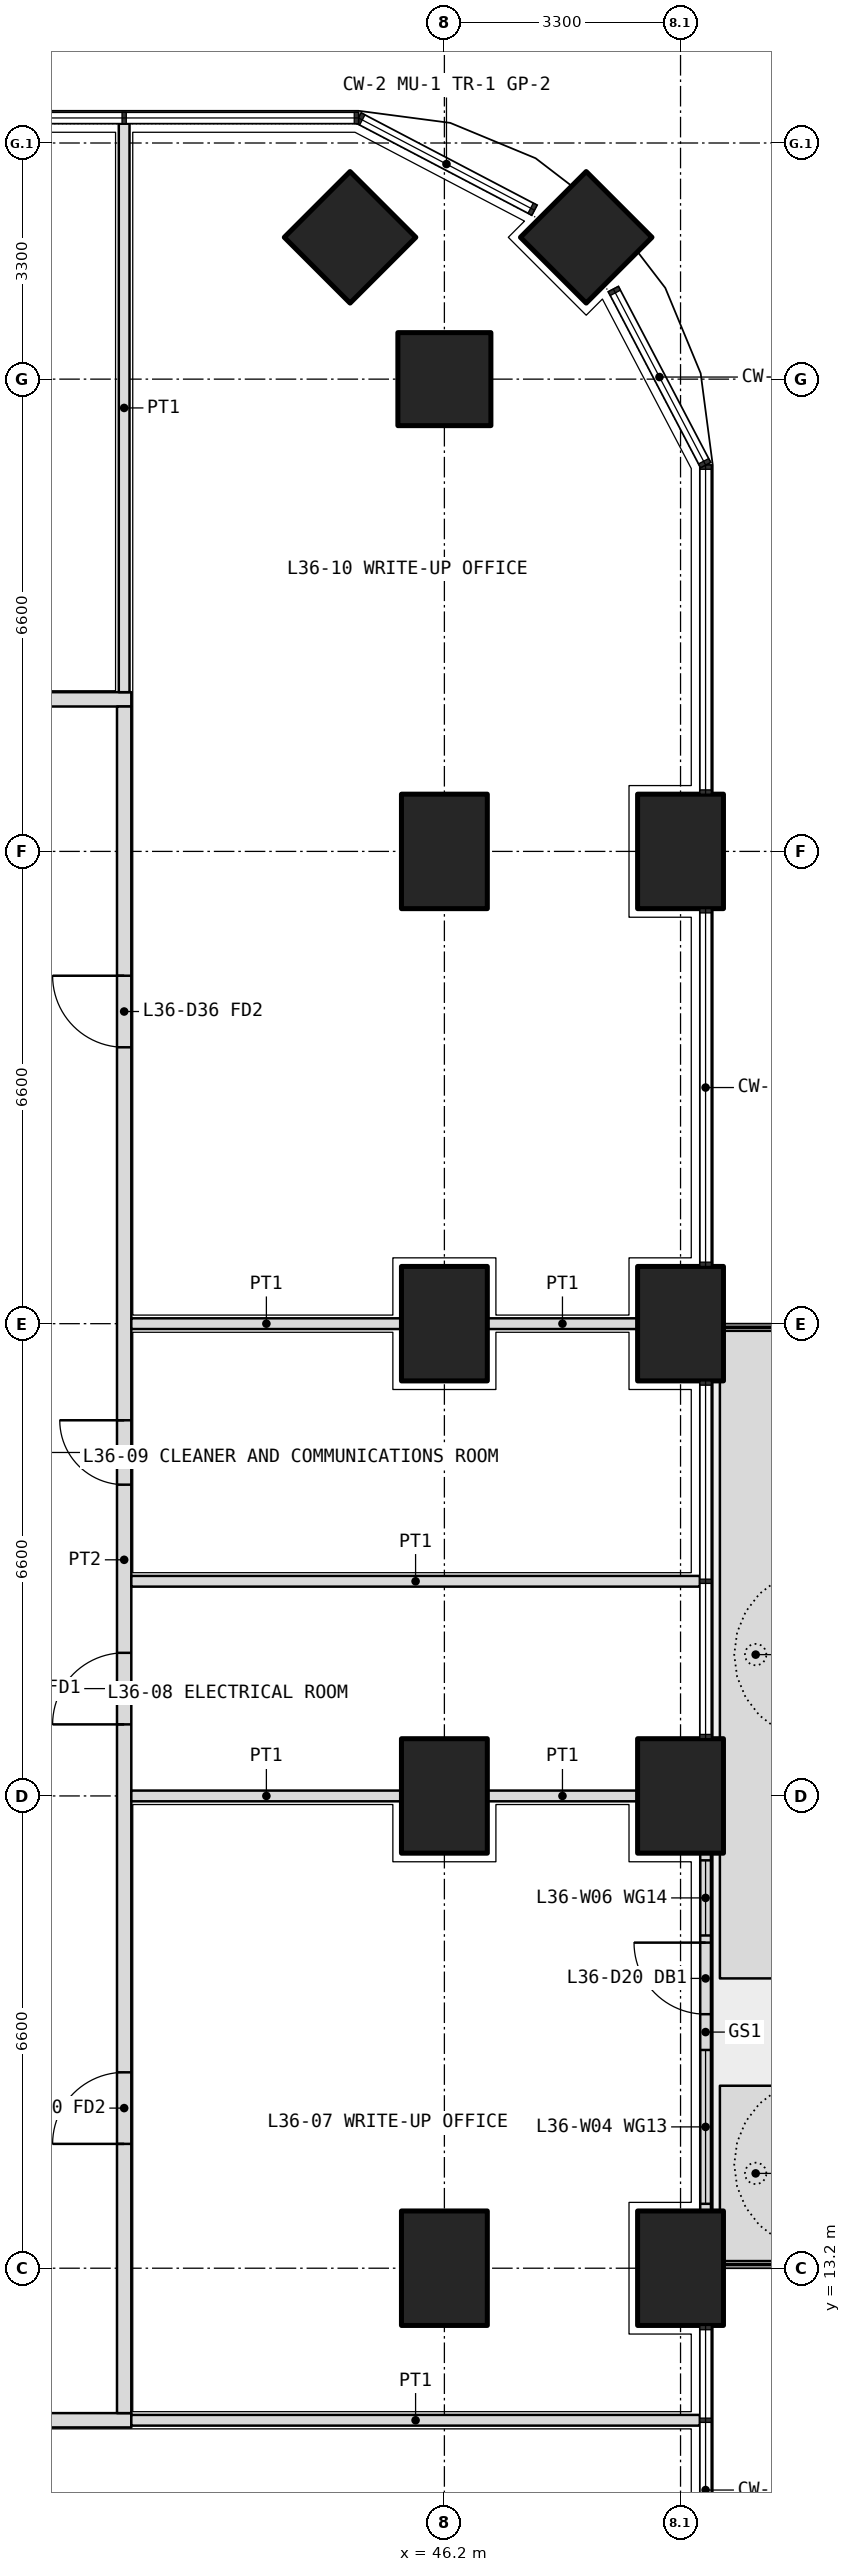
"""IFC4 building model, lengths in metres.
Left out: names, types, materials, properties, quantities, classifications, styles, units other than length and angle.
Written with IfcOpenShell. Run it as: python <this file> out.ifc"""

import sys

from ifc_helpers import new_model, si_unit, direction, frame, frame_2d, origin, origin_2d, place, context, subcontext, project, spatial, polyline, rectangle, outline, extrude, element, fill, save


model = new_model("IFC4")
c1 = context("Model", 3, precision=1e-05, world=origin(), true_north=direction((0.0, 1.0)))
c2 = subcontext(c1, "Body", "Model", "MODEL_VIEW")
j1 = project(units=[si_unit("LENGTHUNIT", "METRE"), si_unit("PLANEANGLEUNIT", "RADIAN")], contexts=[c1])
p1 = place(None, origin())
s1 = spatial("IfcSite", under=j1, at=p1, CompositionType="ELEMENT")
p2 = place(p1, origin())
s2 = spatial("IfcBuilding", under=s1, at=p2, CompositionType="ELEMENT")
p3 = place(p2, frame((0.0, 0.0, 159.9)))
s3 = spatial("IfcBuildingStorey", under=s2, at=p3, CompositionType="ELEMENT", Elevation=159.9)
p4 = place(p3, frame((48.182, 41.582, 0.0), z_axis=(0.0, 0.0, 1.0), x_axis=(0.707106781187, 0.707106781187, 0.0)))
e1 = element("IfcColumn", 1, at=p4, inside=s3, PredefinedType="COLUMN", context=c2, shape_type="SweptSolid", body=[
    extrude(rectangle(XDim=1.3, YDim=1.3, at=origin_2d()), origin(), (0.0, 0.0, 1.0), 4.2),
])
for number, where, z_axis, x_axis in (
    (2, (49.5, 13.2, 0.0), (0.0, 0.0, 1.0), (0.0, 1.0, 0.0)),
    (3, (49.5, 19.8, 0.0), (0.0, 0.0, 1.0), (0.0, 1.0, 0.0)),
    (4, (49.5, 26.4, 0.0), (0.0, 0.0, 1.0), (0.0, 1.0, 0.0)),
    (5, (49.5, 33.0, 0.0), (0.0, 0.0, 1.0), (0.0, 1.0, 0.0)),
):
    element("IfcColumn", number, at=place(p3, frame(where, z_axis=z_axis, x_axis=x_axis)), inside=s3, PredefinedType="COLUMN", context=c2, shape_type="SweptSolid", body=[
        extrude(rectangle(XDim=1.6, YDim=1.2, at=origin_2d()), origin(), (0.0, 0.0, 1.0), 4.2),
    ])
for number, where, z_axis, x_axis in (
    (6, (46.2, 39.6, 0.0), (0.0, 0.0, 1.0), (1.0, 0.0, 0.0)),
    (7, (44.882, 41.582, 0.0), (0.0, 0.0, 1.0), (0.707, 0.707, 0.0)),
):
    element("IfcColumn", number, at=place(p3, frame(where, z_axis=z_axis, x_axis=x_axis)), inside=s3, PredefinedType="COLUMN", context=c2, shape_type="SweptSolid", body=[
        extrude(rectangle(XDim=1.3, YDim=1.3, at=origin_2d()), origin(), (0.0, 0.0, 1.0), 4.2),
    ])
for number, where, z_axis, x_axis in (
    (8, (46.2, 13.2, 0.0), (0.0, 0.0, 1.0), (0.0, 1.0, 0.0)),
    (9, (46.2, 19.8, 0.0), (0.0, 0.0, 1.0), (0.0, 1.0, 0.0)),
    (10, (46.2, 26.4, 0.0), (0.0, 0.0, 1.0), (0.0, 1.0, 0.0)),
    (11, (46.2, 33.0, 0.0), (0.0, 0.0, 1.0), (0.0, 1.0, 0.0)),
):
    element("IfcColumn", number, at=place(p3, frame(where, z_axis=z_axis, x_axis=x_axis)), inside=s3, PredefinedType="COLUMN", context=c2, shape_type="SweptSolid", body=[
        extrude(rectangle(XDim=1.6, YDim=1.2, at=origin_2d()), origin(), (0.0, 0.0, 1.0), 4.2),
    ])
p5 = place(p3, origin())
e12 = element("IfcWall", 12, at=p5, inside=s3, PredefinedType="USERDEFINED", context=c2, shape_type="SweptSolid", body=[
    extrude(outline(polyline([(50.05, 13.3), (51.05, 13.3), (51.05, 15.75), (50.05, 15.75), (50.05, 13.3)]), holes=[polyline([(50.2, 13.45), (50.9, 13.45), (50.9, 15.6), (50.2, 15.6), (50.2, 13.45)])]), origin(), (0.0, 0.0, 1.0), 1.05),
])
p6 = place(p3, origin())
e13 = element("IfcWall", 13, at=p6, inside=s3, PredefinedType="USERDEFINED", context=c2, shape_type="SweptSolid", body=[
    extrude(outline(polyline([(50.05, 17.25), (51.05, 17.25), (51.05, 26.3), (50.05, 26.3), (50.05, 17.25)]), holes=[polyline([(50.2, 17.4), (50.9, 17.4), (50.9, 26.15), (50.2, 26.15), (50.2, 17.4)])]), origin(), (0.0, 0.0, 1.0), 1.05),
])
p7 = place(p3, frame((49.85, 14.0, 0.0), z_axis=(0.0, 0.0, 1.0), x_axis=(0.0, 1.0, 0.0)))
e14 = element("IfcWall", 14, at=p7, inside=s3, PredefinedType="SOLIDWALL", context=c2, shape_type="SweptSolid", body=[
    extrude(rectangle(XDim=5.0, YDim=0.15, at=frame_2d((2.5, 0.0))), origin(), (0.0, 0.0, 1.0), 2.7),
])
p8 = place(p7, frame((2.75, 0.0, 0.0)))
e15 = element("IfcOpeningElement", 15, at=p8, cuts=e14, PredefinedType="OPENING", context=c2, shape_type="SweptSolid", body=[
    extrude(rectangle(XDim=1.0, YDim=2.4, at=frame_2d((0.5, 1.2))), frame((0.0, 0.085, 0.0), z_axis=(0.0, -1.0, 0.0), x_axis=(1.0, 0.0, 0.0)), (0.0, 0.0, 1.0), 0.17),
])
p9 = place(p7, frame((0.1, 0.0, 0.1)))
e16 = element("IfcOpeningElement", 16, at=p9, cuts=e14, PredefinedType="OPENING", context=c2, shape_type="SweptSolid", body=[
    extrude(rectangle(XDim=2.15, YDim=2.3, at=frame_2d((1.075, 1.15))), frame((0.0, 0.085, 0.0), z_axis=(0.0, -1.0, 0.0), x_axis=(1.0, 0.0, 0.0)), (0.0, 0.0, 1.0), 0.17),
])
p10 = place(p7, frame((3.85, 0.0, 0.1)))
e17 = element("IfcOpeningElement", 17, at=p10, cuts=e14, PredefinedType="OPENING", context=c2, shape_type="SweptSolid", body=[
    extrude(rectangle(XDim=1.05, YDim=2.3, at=frame_2d((0.525, 1.15))), frame((0.0, 0.085, 0.0), z_axis=(0.0, -1.0, 0.0), x_axis=(1.0, 0.0, 0.0)), (0.0, 0.0, 1.0), 0.17),
])
p11 = place(p3, frame((16.5, 11.075, 0.0), z_axis=(0.0, 0.0, 1.0), x_axis=(1.0, 0.0, 0.0)))
e18 = element("IfcWall", 18, at=p11, inside=s3, PredefinedType="PARTITIONING", context=c2, shape_type="SweptSolid", body=[
    extrude(rectangle(XDim=25.325, YDim=0.2, at=frame_2d((12.663, 0.0))), origin(), (0.0, 0.0, 1.0), 2.85),
])
p12 = place(p11, frame((1.6, 0.0, 0.0)))
e19 = element("IfcOpeningElement", 19, at=p12, cuts=e18, PredefinedType="OPENING", context=c2, shape_type="SweptSolid", body=[
    extrude(rectangle(XDim=1.0, YDim=2.1, at=frame_2d((0.5, 1.05))), frame((0.0, 0.11, 0.0), z_axis=(0.0, -1.0, 0.0), x_axis=(1.0, 0.0, 0.0)), (0.0, 0.0, 1.0), 0.22),
])
p13 = place(p11, frame((4.9, 0.0, 0.0)))
e20 = element("IfcOpeningElement", 20, at=p13, cuts=e18, PredefinedType="OPENING", context=c2, shape_type="SweptSolid", body=[
    extrude(rectangle(XDim=1.0, YDim=2.1, at=frame_2d((0.5, 1.05))), frame((0.0, 0.11, 0.0), z_axis=(0.0, -1.0, 0.0), x_axis=(1.0, 0.0, 0.0)), (0.0, 0.0, 1.0), 0.22),
])
p14 = place(p11, frame((7.65, 0.0, 0.0)))
e21 = element("IfcOpeningElement", 21, at=p14, cuts=e18, PredefinedType="OPENING", context=c2, shape_type="SweptSolid", body=[
    extrude(rectangle(XDim=1.2, YDim=2.1, at=frame_2d((0.6, 1.05))), frame((0.0, 0.11, 0.0), z_axis=(0.0, -1.0, 0.0), x_axis=(1.0, 0.0, 0.0)), (0.0, 0.0, 1.0), 0.22),
])
p15 = place(p11, frame((16.962, 0.0, 0.0)))
e22 = element("IfcOpeningElement", 22, at=p15, cuts=e18, PredefinedType="OPENING", context=c2, shape_type="SweptSolid", body=[
    extrude(rectangle(XDim=1.2, YDim=2.1, at=frame_2d((0.6, 1.05))), frame((0.0, 0.11, 0.0), z_axis=(0.0, -1.0, 0.0), x_axis=(1.0, 0.0, 0.0)), (0.0, 0.0, 1.0), 0.22),
])
p16 = place(p3, frame((10.975, 35.125, 0.0), z_axis=(0.0, 0.0, 1.0), x_axis=(1.0, 0.0, 0.0)))
e23 = element("IfcWall", 23, at=p16, inside=s3, PredefinedType="PARTITIONING", context=c2, shape_type="SweptSolid", body=[
    extrude(rectangle(XDim=30.85, YDim=0.2, at=frame_2d((15.425, 0.0))), origin(), (0.0, 0.0, 1.0), 2.85),
])
p17 = place(p16, frame((0.663, 0.0, 0.0)))
e24 = element("IfcOpeningElement", 24, at=p17, cuts=e23, PredefinedType="OPENING", context=c2, shape_type="SweptSolid", body=[
    extrude(rectangle(XDim=1.0, YDim=2.1, at=frame_2d((0.5, 1.05))), frame((0.0, 0.11, 0.0), z_axis=(0.0, -1.0, 0.0), x_axis=(1.0, 0.0, 0.0)), (0.0, 0.0, 1.0), 0.22),
])
p18 = place(p16, frame((3.275, 0.0, 0.0)))
e25 = element("IfcOpeningElement", 25, at=p18, cuts=e23, PredefinedType="OPENING", context=c2, shape_type="SweptSolid", body=[
    extrude(rectangle(XDim=1.2, YDim=2.1, at=frame_2d((0.6, 1.05))), frame((0.0, 0.11, 0.0), z_axis=(0.0, -1.0, 0.0), x_axis=(1.0, 0.0, 0.0)), (0.0, 0.0, 1.0), 0.22),
])
p19 = place(p16, frame((11.625, 0.0, 0.0)))
e26 = element("IfcOpeningElement", 26, at=p19, cuts=e23, PredefinedType="OPENING", context=c2, shape_type="SweptSolid", body=[
    extrude(rectangle(XDim=1.0, YDim=2.1, at=frame_2d((0.5, 1.05))), frame((0.0, 0.11, 0.0), z_axis=(0.0, -1.0, 0.0), x_axis=(1.0, 0.0, 0.0)), (0.0, 0.0, 1.0), 0.22),
])
p20 = place(p16, frame((24.137, 0.0, 0.0)))
e27 = element("IfcOpeningElement", 27, at=p20, cuts=e23, PredefinedType="OPENING", context=c2, shape_type="SweptSolid", body=[
    extrude(rectangle(XDim=1.2, YDim=2.1, at=frame_2d((0.6, 1.05))), frame((0.0, 0.11, 0.0), z_axis=(0.0, -1.0, 0.0), x_axis=(1.0, 0.0, 0.0)), (0.0, 0.0, 1.0), 0.22),
])
p21 = place(p3, frame((41.725, 11.175, 0.0), z_axis=(0.0, 0.0, 1.0), x_axis=(0.0, 1.0, 0.0)))
e28 = element("IfcWall", 28, at=p21, inside=s3, PredefinedType="PARTITIONING", context=c2, shape_type="SweptSolid", body=[
    extrude(rectangle(XDim=23.85, YDim=0.2, at=frame_2d((11.925, 0.0))), origin(), (0.0, 0.0, 1.0), 2.85),
])
p22 = place(p21, frame((3.762, 0.0, 0.0)))
e29 = element("IfcOpeningElement", 29, at=p22, cuts=e28, PredefinedType="OPENING", context=c2, shape_type="SweptSolid", body=[
    extrude(rectangle(XDim=1.0, YDim=2.1, at=frame_2d((0.5, 1.05))), frame((0.0, 0.11, 0.0), z_axis=(0.0, -1.0, 0.0), x_axis=(1.0, 0.0, 0.0)), (0.0, 0.0, 1.0), 0.22),
])
p23 = place(p21, frame((9.625, 0.0, 0.0)))
e30 = element("IfcOpeningElement", 30, at=p23, cuts=e28, PredefinedType="OPENING", context=c2, shape_type="SweptSolid", body=[
    extrude(rectangle(XDim=1.0, YDim=2.1, at=frame_2d((0.5, 1.05))), frame((0.0, 0.11, 0.0), z_axis=(0.0, -1.0, 0.0), x_axis=(1.0, 0.0, 0.0)), (0.0, 0.0, 1.0), 0.22),
])
p24 = place(p21, frame((12.975, 0.0, 0.0)))
e31 = element("IfcOpeningElement", 31, at=p24, cuts=e28, PredefinedType="OPENING", context=c2, shape_type="SweptSolid", body=[
    extrude(rectangle(XDim=0.9, YDim=2.1, at=frame_2d((0.45, 1.05))), frame((0.0, 0.11, 0.0), z_axis=(0.0, -1.0, 0.0), x_axis=(1.0, 0.0, 0.0)), (0.0, 0.0, 1.0), 0.22),
])
p25 = place(p21, frame((19.087, 0.0, 0.0)))
e32 = element("IfcOpeningElement", 32, at=p25, cuts=e28, PredefinedType="OPENING", context=c2, shape_type="SweptSolid", body=[
    extrude(rectangle(XDim=1.0, YDim=2.1, at=frame_2d((0.5, 1.05))), frame((0.0, 0.11, 0.0), z_axis=(0.0, -1.0, 0.0), x_axis=(1.0, 0.0, 0.0)), (0.0, 0.0, 1.0), 0.22),
])
p26 = place(p3, frame((49.77, 11.075, 0.0), z_axis=(0.0, 0.0, 1.0), x_axis=(-1.0, 0.0, 0.0)))
e33 = element("IfcWall", 33, at=p26, inside=s3, PredefinedType="PARTITIONING", context=c2, shape_type="SweptSolid", body=[
    extrude(rectangle(XDim=7.945, YDim=0.15, at=frame_2d((3.973, 0.0))), origin(), (0.0, 0.0, 1.0), 2.7),
])
p27 = place(p3, frame((41.725, 43.17, 0.0), z_axis=(0.0, 0.0, 1.0), x_axis=(0.0, -1.0, 0.0)))
e34 = element("IfcWall", 34, at=p27, inside=s3, PredefinedType="PARTITIONING", context=c2, shape_type="SweptSolid", body=[
    extrude(rectangle(XDim=7.945, YDim=0.15, at=frame_2d((3.972, 0.0))), origin(), (0.0, 0.0, 1.0), 2.7),
])
p28 = place(p3, frame((49.77, 22.8, 0.0), z_axis=(0.0, 0.0, 1.0), x_axis=(-1.0, 0.0, 0.0)))
e35 = element("IfcWall", 35, at=p28, inside=s3, PredefinedType="PARTITIONING", context=c2, shape_type="SweptSolid", body=[
    extrude(rectangle(XDim=7.945, YDim=0.15, at=frame_2d((3.973, 0.0))), origin(), (0.0, 0.0, 1.0), 2.7),
])
p29 = place(p3, frame((48.9, 26.4, 0.0), z_axis=(0.0, 0.0, 1.0), x_axis=(-1.0, 0.0, 0.0)))
e36 = element("IfcWall", 36, at=p29, inside=s3, PredefinedType="PARTITIONING", context=c2, shape_type="SweptSolid", body=[
    extrude(rectangle(XDim=2.1, YDim=0.15, at=frame_2d((1.05, 0.0))), origin(), (0.0, 0.0, 1.0), 2.85),
])
p30 = place(p3, frame((45.6, 26.4, 0.0), z_axis=(0.0, 0.0, 1.0), x_axis=(-1.0, 0.0, 0.0)))
e37 = element("IfcWall", 37, at=p30, inside=s3, PredefinedType="PARTITIONING", context=c2, shape_type="SweptSolid", body=[
    extrude(rectangle(XDim=3.775, YDim=0.15, at=frame_2d((1.888, 0.0))), origin(), (0.0, 0.0, 1.0), 2.85),
])
p31 = place(p3, frame((48.9, 19.8, 0.0), z_axis=(0.0, 0.0, 1.0), x_axis=(-1.0, 0.0, 0.0)))
e38 = element("IfcWall", 38, at=p31, inside=s3, PredefinedType="PARTITIONING", context=c2, shape_type="SweptSolid", body=[
    extrude(rectangle(XDim=2.1, YDim=0.15, at=frame_2d((1.05, 0.0))), origin(), (0.0, 0.0, 1.0), 2.85),
])
p32 = place(p3, frame((45.6, 19.8, 0.0), z_axis=(0.0, 0.0, 1.0), x_axis=(-1.0, 0.0, 0.0)))
e39 = element("IfcWall", 39, at=p32, inside=s3, PredefinedType="PARTITIONING", context=c2, shape_type="SweptSolid", body=[
    extrude(rectangle(XDim=3.775, YDim=0.15, at=frame_2d((1.888, 0.0))), origin(), (0.0, 0.0, 1.0), 2.85),
])
p33 = place(p8, origin())
e40 = element("IfcDoor", 40, at=p33, inside=s3, OperationType="SINGLE_SWING_RIGHT", PredefinedType="DOOR", context=c2, shape_type="SweptSolid", body=[
    extrude(rectangle(XDim=1.0, YDim=2.4, at=frame_2d((0.5, 1.2))), frame((0.0, 0.025, 0.0), z_axis=(0.0, -1.0, 0.0), x_axis=(1.0, 0.0, 0.0)), (0.0, 0.0, 1.0), 0.05),
])
fill(e15, e40)
p34 = place(p9, origin())
e41 = element("IfcWindow", 41, at=p34, inside=s3, PartitioningType="SINGLE_PANEL", PredefinedType="WINDOW", context=c2, shape_type="SweptSolid", body=[
    extrude(rectangle(XDim=2.15, YDim=2.3, at=frame_2d((1.075, 1.15))), frame((0.0, 0.03, 0.0), z_axis=(0.0, -1.0, 0.0), x_axis=(1.0, 0.0, 0.0)), (0.0, 0.0, 1.0), 0.06),
])
fill(e16, e41)
p35 = place(p10, origin())
e42 = element("IfcWindow", 42, at=p35, inside=s3, PartitioningType="SINGLE_PANEL", PredefinedType="WINDOW", context=c2, shape_type="SweptSolid", body=[
    extrude(rectangle(XDim=1.05, YDim=2.3, at=frame_2d((0.525, 1.15))), frame((0.0, 0.03, 0.0), z_axis=(0.0, -1.0, 0.0), x_axis=(1.0, 0.0, 0.0)), (0.0, 0.0, 1.0), 0.06),
])
fill(e17, e42)
p36 = place(p22, origin())
e43 = element("IfcDoor", 43, at=p36, inside=s3, OperationType="SINGLE_SWING_LEFT", PredefinedType="DOOR", context=c2, shape_type="SweptSolid", body=[
    extrude(rectangle(XDim=1.0, YDim=2.1, at=frame_2d((0.5, 1.05))), frame((0.0, 0.025, 0.0), z_axis=(0.0, -1.0, 0.0), x_axis=(1.0, 0.0, 0.0)), (0.0, 0.0, 1.0), 0.05),
])
fill(e29, e43)
p37 = place(p23, origin())
e44 = element("IfcDoor", 44, at=p37, inside=s3, OperationType="SINGLE_SWING_LEFT", PredefinedType="DOOR", context=c2, shape_type="SweptSolid", body=[
    extrude(rectangle(XDim=1.0, YDim=2.1, at=frame_2d((0.5, 1.05))), frame((0.0, 0.025, 0.0), z_axis=(0.0, -1.0, 0.0), x_axis=(1.0, 0.0, 0.0)), (0.0, 0.0, 1.0), 0.05),
])
fill(e30, e44)
p38 = place(p24, origin())
e45 = element("IfcDoor", 45, at=p38, inside=s3, OperationType="SINGLE_SWING_RIGHT", PredefinedType="DOOR", context=c2, shape_type="SweptSolid", body=[
    extrude(rectangle(XDim=0.9, YDim=2.1, at=frame_2d((0.45, 1.05))), frame((0.0, 0.025, 0.0), z_axis=(0.0, -1.0, 0.0), x_axis=(1.0, 0.0, 0.0)), (0.0, 0.0, 1.0), 0.05),
])
fill(e31, e45)
p39 = place(p25, origin())
e46 = element("IfcDoor", 46, at=p39, inside=s3, OperationType="SINGLE_SWING_RIGHT", PredefinedType="DOOR", context=c2, shape_type="SweptSolid", body=[
    extrude(rectangle(XDim=1.0, YDim=2.1, at=frame_2d((0.5, 1.05))), frame((0.0, 0.025, 0.0), z_axis=(0.0, -1.0, 0.0), x_axis=(1.0, 0.0, 0.0)), (0.0, 0.0, 1.0), 0.05),
])
fill(e32, e46)
save(model, sys.argv[1])
